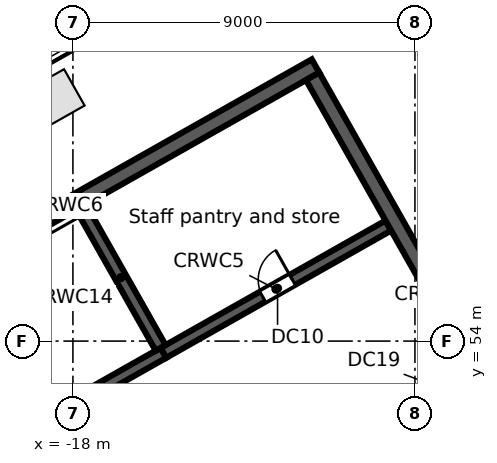
"""IFC4 building model, lengths in metres.
Left out: names, types, materials, properties, quantities, classifications, styles, units other than length and angle.
Written with IfcOpenShell. Run it as: python <this file> out.ifc"""

import sys

from ifc_helpers import new_model, si_unit, direction, frame, frame_2d, origin, origin_2d, place, context, subcontext, project, spatial, rectangle, extrude, element, fill, save


model = new_model("IFC4")
c1 = context("Model", 3, precision=1e-05, world=origin(), true_north=direction((0.0, 1.0)))
c2 = subcontext(c1, "Body", "Model", "MODEL_VIEW")
j1 = project(units=[si_unit("LENGTHUNIT", "METRE"), si_unit("PLANEANGLEUNIT", "RADIAN")], contexts=[c1])
p1 = place(None, origin())
s1 = spatial("IfcSite", under=j1, at=p1, CompositionType="ELEMENT")
p2 = place(p1, origin())
s2 = spatial("IfcBuilding", under=s1, at=p2, CompositionType="ELEMENT")
p3 = place(p2, frame((0.0, 0.0, 277.9)))
s3 = spatial("IfcBuildingStorey", under=s2, at=p3, CompositionType="ELEMENT", Elevation=277.9)
p4 = place(p3, frame((-18.441, 60.406, 0.0), z_axis=(0.0, 0.0, 1.0), x_axis=(-0.87035569594, -0.492423560103, 0.0)))
e1 = element("IfcColumn", 1, at=p4, inside=s3, PredefinedType="COLUMN", context=c2, shape_type="SweptSolid", body=[
    extrude(rectangle(XDim=1.1, YDim=1.1, at=origin_2d()), origin(), (0.0, 0.0, 1.0), 3.8),
])
p5 = place(p3, frame((-58.732, 38.771, 0.0), z_axis=(0.0, 0.0, 1.0), x_axis=(0.870355615581, 0.492423702137, 0.0)))
e2 = element("IfcWall", 2, at=p5, inside=s3, PredefinedType="STANDARD", context=c2, shape_type="SweptSolid", body=[
    extrude(rectangle(XDim=64.052, YDim=0.25, at=frame_2d((32.026, 0.0))), origin(), (0.0, 0.0, 1.0), 3.52),
])
p6 = place(p5, frame((61.259, 0.0, 0.8)))
e3 = element("IfcOpeningElement", 3, at=p6, cuts=e2, PredefinedType="OPENING", context=c2, shape_type="SweptSolid", body=[
    extrude(rectangle(XDim=2.4, YDim=2.2, at=frame_2d((1.2, 1.1))), frame((0.0, 0.135, 0.0), z_axis=(0.0, -1.0, 0.0), x_axis=(1.0, 0.0, 0.0)), (0.0, 0.0, 1.0), 0.27),
])
p7 = place(p5, frame((58.216, 0.0, 0.8)))
e4 = element("IfcOpeningElement", 4, at=p7, cuts=e2, PredefinedType="OPENING", context=c2, shape_type="SweptSolid", body=[
    extrude(rectangle(XDim=2.4, YDim=2.2, at=frame_2d((1.2, 1.1))), frame((0.0, 0.135, 0.0), z_axis=(0.0, -1.0, 0.0), x_axis=(1.0, 0.0, 0.0)), (0.0, 0.0, 1.0), 0.27),
])
p8 = place(p5, frame((55.173, 0.0, 0.8)))
e5 = element("IfcOpeningElement", 5, at=p8, cuts=e2, PredefinedType="OPENING", context=c2, shape_type="SweptSolid", body=[
    extrude(rectangle(XDim=2.4, YDim=2.2, at=frame_2d((1.2, 1.1))), frame((0.0, 0.135, 0.0), z_axis=(0.0, -1.0, 0.0), x_axis=(1.0, 0.0, 0.0)), (0.0, 0.0, 1.0), 0.27),
])
p9 = place(p5, frame((52.129, 0.0, 0.8)))
e6 = element("IfcOpeningElement", 6, at=p9, cuts=e2, PredefinedType="OPENING", context=c2, shape_type="SweptSolid", body=[
    extrude(rectangle(XDim=2.4, YDim=2.2, at=frame_2d((1.2, 1.1))), frame((0.0, 0.135, 0.0), z_axis=(0.0, -1.0, 0.0), x_axis=(1.0, 0.0, 0.0)), (0.0, 0.0, 1.0), 0.27),
])
p10 = place(p5, frame((49.086, 0.0, 0.8)))
e7 = element("IfcOpeningElement", 7, at=p10, cuts=e2, PredefinedType="OPENING", context=c2, shape_type="SweptSolid", body=[
    extrude(rectangle(XDim=2.4, YDim=2.2, at=frame_2d((1.2, 1.1))), frame((0.0, 0.135, 0.0), z_axis=(0.0, -1.0, 0.0), x_axis=(1.0, 0.0, 0.0)), (0.0, 0.0, 1.0), 0.27),
])
p11 = place(p5, frame((46.043, 0.0, 0.8)))
e8 = element("IfcOpeningElement", 8, at=p11, cuts=e2, PredefinedType="OPENING", context=c2, shape_type="SweptSolid", body=[
    extrude(rectangle(XDim=2.4, YDim=2.2, at=frame_2d((1.2, 1.1))), frame((0.0, 0.135, 0.0), z_axis=(0.0, -1.0, 0.0), x_axis=(1.0, 0.0, 0.0)), (0.0, 0.0, 1.0), 0.27),
])
p12 = place(p5, frame((43.0, 0.0, 0.8)))
e9 = element("IfcOpeningElement", 9, at=p12, cuts=e2, PredefinedType="OPENING", context=c2, shape_type="SweptSolid", body=[
    extrude(rectangle(XDim=2.4, YDim=2.2, at=frame_2d((1.2, 1.1))), frame((0.0, 0.135, 0.0), z_axis=(0.0, -1.0, 0.0), x_axis=(1.0, 0.0, 0.0)), (0.0, 0.0, 1.0), 0.27),
])
p13 = place(p5, frame((39.956, 0.0, 0.8)))
e10 = element("IfcOpeningElement", 10, at=p13, cuts=e2, PredefinedType="OPENING", context=c2, shape_type="SweptSolid", body=[
    extrude(rectangle(XDim=2.4, YDim=2.2, at=frame_2d((1.2, 1.1))), frame((0.0, 0.135, 0.0), z_axis=(0.0, -1.0, 0.0), x_axis=(1.0, 0.0, 0.0)), (0.0, 0.0, 1.0), 0.27),
])
p14 = place(p5, frame((36.913, 0.0, 0.8)))
e11 = element("IfcOpeningElement", 11, at=p14, cuts=e2, PredefinedType="OPENING", context=c2, shape_type="SweptSolid", body=[
    extrude(rectangle(XDim=2.4, YDim=2.2, at=frame_2d((1.2, 1.1))), frame((0.0, 0.135, 0.0), z_axis=(0.0, -1.0, 0.0), x_axis=(1.0, 0.0, 0.0)), (0.0, 0.0, 1.0), 0.27),
])
p15 = place(p5, frame((33.87, 0.0, 0.8)))
e12 = element("IfcOpeningElement", 12, at=p15, cuts=e2, PredefinedType="OPENING", context=c2, shape_type="SweptSolid", body=[
    extrude(rectangle(XDim=2.4, YDim=2.2, at=frame_2d((1.2, 1.1))), frame((0.0, 0.135, 0.0), z_axis=(0.0, -1.0, 0.0), x_axis=(1.0, 0.0, 0.0)), (0.0, 0.0, 1.0), 0.27),
])
p16 = place(p5, frame((30.826, 0.0, 0.8)))
e13 = element("IfcOpeningElement", 13, at=p16, cuts=e2, PredefinedType="OPENING", context=c2, shape_type="SweptSolid", body=[
    extrude(rectangle(XDim=2.4, YDim=2.2, at=frame_2d((1.2, 1.1))), frame((0.0, 0.135, 0.0), z_axis=(0.0, -1.0, 0.0), x_axis=(1.0, 0.0, 0.0)), (0.0, 0.0, 1.0), 0.27),
])
p17 = place(p5, frame((27.783, 0.0, 0.8)))
e14 = element("IfcOpeningElement", 14, at=p17, cuts=e2, PredefinedType="OPENING", context=c2, shape_type="SweptSolid", body=[
    extrude(rectangle(XDim=2.4, YDim=2.2, at=frame_2d((1.2, 1.1))), frame((0.0, 0.135, 0.0), z_axis=(0.0, -1.0, 0.0), x_axis=(1.0, 0.0, 0.0)), (0.0, 0.0, 1.0), 0.27),
])
p18 = place(p5, frame((24.74, 0.0, 0.8)))
e15 = element("IfcOpeningElement", 15, at=p18, cuts=e2, PredefinedType="OPENING", context=c2, shape_type="SweptSolid", body=[
    extrude(rectangle(XDim=2.4, YDim=2.2, at=frame_2d((1.2, 1.1))), frame((0.0, 0.135, 0.0), z_axis=(0.0, -1.0, 0.0), x_axis=(1.0, 0.0, 0.0)), (0.0, 0.0, 1.0), 0.27),
])
p19 = place(p5, frame((21.696, 0.0, 0.8)))
e16 = element("IfcOpeningElement", 16, at=p19, cuts=e2, PredefinedType="OPENING", context=c2, shape_type="SweptSolid", body=[
    extrude(rectangle(XDim=2.4, YDim=2.2, at=frame_2d((1.2, 1.1))), frame((0.0, 0.135, 0.0), z_axis=(0.0, -1.0, 0.0), x_axis=(1.0, 0.0, 0.0)), (0.0, 0.0, 1.0), 0.27),
])
p20 = place(p5, frame((18.653, 0.0, 0.8)))
e17 = element("IfcOpeningElement", 17, at=p20, cuts=e2, PredefinedType="OPENING", context=c2, shape_type="SweptSolid", body=[
    extrude(rectangle(XDim=2.4, YDim=2.2, at=frame_2d((1.2, 1.1))), frame((0.0, 0.135, 0.0), z_axis=(0.0, -1.0, 0.0), x_axis=(1.0, 0.0, 0.0)), (0.0, 0.0, 1.0), 0.27),
])
p21 = place(p5, frame((15.61, 0.0, 0.8)))
e18 = element("IfcOpeningElement", 18, at=p21, cuts=e2, PredefinedType="OPENING", context=c2, shape_type="SweptSolid", body=[
    extrude(rectangle(XDim=2.4, YDim=2.2, at=frame_2d((1.2, 1.1))), frame((0.0, 0.135, 0.0), z_axis=(0.0, -1.0, 0.0), x_axis=(1.0, 0.0, 0.0)), (0.0, 0.0, 1.0), 0.27),
])
p22 = place(p5, frame((12.567, 0.0, 0.8)))
e19 = element("IfcOpeningElement", 19, at=p22, cuts=e2, PredefinedType="OPENING", context=c2, shape_type="SweptSolid", body=[
    extrude(rectangle(XDim=2.4, YDim=2.2, at=frame_2d((1.2, 1.1))), frame((0.0, 0.135, 0.0), z_axis=(0.0, -1.0, 0.0), x_axis=(1.0, 0.0, 0.0)), (0.0, 0.0, 1.0), 0.27),
])
p23 = place(p5, frame((9.523, 0.0, 0.8)))
e20 = element("IfcOpeningElement", 20, at=p23, cuts=e2, PredefinedType="OPENING", context=c2, shape_type="SweptSolid", body=[
    extrude(rectangle(XDim=2.4, YDim=2.2, at=frame_2d((1.2, 1.1))), frame((0.0, 0.135, 0.0), z_axis=(0.0, -1.0, 0.0), x_axis=(1.0, 0.0, 0.0)), (0.0, 0.0, 1.0), 0.27),
])
p24 = place(p5, frame((6.48, 0.0, 0.8)))
e21 = element("IfcOpeningElement", 21, at=p24, cuts=e2, PredefinedType="OPENING", context=c2, shape_type="SweptSolid", body=[
    extrude(rectangle(XDim=2.4, YDim=2.2, at=frame_2d((1.2, 1.1))), frame((0.0, 0.135, 0.0), z_axis=(0.0, -1.0, 0.0), x_axis=(1.0, 0.0, 0.0)), (0.0, 0.0, 1.0), 0.27),
])
p25 = place(p5, frame((3.437, 0.0, 0.8)))
e22 = element("IfcOpeningElement", 22, at=p25, cuts=e2, PredefinedType="OPENING", context=c2, shape_type="SweptSolid", body=[
    extrude(rectangle(XDim=2.4, YDim=2.2, at=frame_2d((1.2, 1.1))), frame((0.0, 0.135, 0.0), z_axis=(0.0, -1.0, 0.0), x_axis=(1.0, 0.0, 0.0)), (0.0, 0.0, 1.0), 0.27),
])
p26 = place(p5, frame((0.393, 0.0, 0.8)))
e23 = element("IfcOpeningElement", 23, at=p26, cuts=e2, PredefinedType="OPENING", context=c2, shape_type="SweptSolid", body=[
    extrude(rectangle(XDim=2.4, YDim=2.2, at=frame_2d((1.2, 1.1))), frame((0.0, 0.135, 0.0), z_axis=(0.0, -1.0, 0.0), x_axis=(1.0, 0.0, 0.0)), (0.0, 0.0, 1.0), 0.27),
])
p27 = place(p3, frame((-13.365, 49.911, 0.0), z_axis=(0.0, 0.0, 1.0), x_axis=(0.870347618718, 0.492437836272, 0.0)))
e24 = element("IfcWall", 24, at=p27, inside=s3, PredefinedType="SOLIDWALL", context=c2, shape_type="SweptSolid", body=[
    extrude(rectangle(XDim=6.7, YDim=0.3, at=frame_2d((3.35, 0.0))), origin(), (0.0, 0.0, 1.0), 3.52),
])
p28 = place(p27, frame((1.95, 0.0, 0.0)))
e25 = element("IfcOpeningElement", 25, at=p28, cuts=e24, PredefinedType="OPENING", context=c2, shape_type="SweptSolid", body=[
    extrude(rectangle(XDim=0.9, YDim=2.1, at=frame_2d((0.45, 1.05))), frame((0.0, 0.16, 0.0), z_axis=(0.0, -1.0, 0.0), x_axis=(1.0, 0.0, 0.0)), (0.0, 0.0, 1.0), 0.32),
])
p29 = place(p27, frame((5.35, 0.0, 0.0)))
e26 = element("IfcOpeningElement", 26, at=p29, cuts=e24, PredefinedType="OPENING", context=c2, shape_type="SweptSolid", body=[
    extrude(rectangle(XDim=0.9, YDim=2.1, at=frame_2d((0.45, 1.05))), frame((0.0, 0.16, 0.0), z_axis=(0.0, -1.0, 0.0), x_axis=(1.0, 0.0, 0.0)), (0.0, 0.0, 1.0), 0.32),
])
p30 = place(p3, frame((-22.059, 50.047, 0.0), z_axis=(0.0, 0.0, 1.0), x_axis=(0.87035077051, 0.49243226567, 0.0)))
e27 = element("IfcWall", 27, at=p30, inside=s3, PredefinedType="SOLIDWALL", context=c2, shape_type="SweptSolid", body=[
    extrude(rectangle(XDim=7.4, YDim=0.3, at=frame_2d((3.7, 0.0))), origin(), (0.0, 0.0, 1.0), 3.52),
])
p31 = place(p30, frame((0.4, 0.0, 0.0)))
e28 = element("IfcOpeningElement", 28, at=p31, cuts=e27, PredefinedType="OPENING", context=c2, shape_type="SweptSolid", body=[
    extrude(rectangle(XDim=1.0, YDim=2.1, at=frame_2d((0.5, 1.05))), frame((0.0, 0.16, 0.0), z_axis=(0.0, -1.0, 0.0), x_axis=(1.0, 0.0, 0.0)), (0.0, 0.0, 1.0), 0.32),
])
p32 = place(p3, frame((-15.618, 53.691, 0.0), z_axis=(0.0, 0.0, 1.0), x_axis=(0.870362830851, 0.492410948978, 0.0)))
e29 = element("IfcWall", 29, at=p32, inside=s3, PredefinedType="SOLIDWALL", context=c2, shape_type="SweptSolid", body=[
    extrude(rectangle(XDim=6.8, YDim=0.3, at=frame_2d((3.4, 0.0))), origin(), (0.0, 0.0, 1.0), 3.52),
])
p33 = place(p32, frame((3.0, 0.0, 0.0)))
e30 = element("IfcOpeningElement", 30, at=p33, cuts=e29, PredefinedType="OPENING", context=c2, shape_type="SweptSolid", body=[
    extrude(rectangle(XDim=0.9, YDim=2.1, at=frame_2d((0.45, 1.05))), frame((0.0, 0.16, 0.0), z_axis=(0.0, -1.0, 0.0), x_axis=(1.0, 0.0, 0.0)), (0.0, 0.0, 1.0), 0.32),
])
p34 = place(p3, frame((-24.672, 53.854, 0.0), z_axis=(0.0, 0.0, 1.0), x_axis=(0.870353598469, 0.492427267353, 0.0)))
e31 = element("IfcWall", 31, at=p34, inside=s3, PredefinedType="SOLIDWALL", context=c2, shape_type="SweptSolid", body=[
    extrude(rectangle(XDim=15.0, YDim=0.4, at=frame_2d((7.5, 0.0))), origin(), (0.0, 0.0, 1.0), 3.52),
])
p35 = place(p3, frame((-24.4, 53.779, 0.0), z_axis=(0.0, 0.0, 1.0), x_axis=(0.492421663121, -0.870356769198, 0.0)))
e32 = element("IfcWall", 32, at=p35, inside=s3, PredefinedType="SOLIDWALL", context=c2, shape_type="SweptSolid", body=[
    extrude(rectangle(XDim=13.2, YDim=0.4, at=frame_2d((6.6, 0.0))), origin(), (0.0, 0.0, 1.0), 3.52),
])
p36 = place(p3, frame((-17.785, 57.521, 0.0), z_axis=(0.0, 0.0, 1.0), x_axis=(0.492422543467, -0.870356271124, 0.0)))
e33 = element("IfcWall", 33, at=p36, inside=s3, PredefinedType="SOLIDWALL", context=c2, shape_type="SweptSolid", body=[
    extrude(rectangle(XDim=4.25, YDim=0.3, at=frame_2d((2.125, 0.0))), origin(), (0.0, 0.0, 1.0), 3.52),
])
p37 = place(p3, frame((-11.692, 60.968, 0.0), z_axis=(0.0, 0.0, 1.0), x_axis=(0.492421663121, -0.870356769198, 0.0)))
e34 = element("IfcWall", 34, at=p37, inside=s3, PredefinedType="SOLIDWALL", context=c2, shape_type="SweptSolid", body=[
    extrude(rectangle(XDim=13.2, YDim=0.4, at=frame_2d((6.6, 0.0))), origin(), (0.0, 0.0, 1.0), 3.52),
])
p38 = place(p11, origin())
e35 = element("IfcWindow", 35, at=p38, inside=s3, PartitioningType="SINGLE_PANEL", PredefinedType="WINDOW", context=c2, shape_type="SweptSolid", body=[
    extrude(rectangle(XDim=2.4, YDim=2.2, at=frame_2d((1.2, 1.1))), frame((0.0, 0.03, 0.0), z_axis=(0.0, -1.0, 0.0), x_axis=(1.0, 0.0, 0.0)), (0.0, 0.0, 1.0), 0.06),
])
fill(e8, e35)
p39 = place(p33, origin())
e36 = element("IfcDoor", 36, at=p39, inside=s3, OperationType="SINGLE_SWING_RIGHT", PredefinedType="DOOR", context=c2, shape_type="SweptSolid", body=[
    extrude(rectangle(XDim=0.9, YDim=2.1, at=frame_2d((0.45, 1.05))), frame((0.0, 0.025, 0.0), z_axis=(0.0, -1.0, 0.0), x_axis=(1.0, 0.0, 0.0)), (0.0, 0.0, 1.0), 0.05),
])
fill(e30, e36)
save(model, sys.argv[1])
